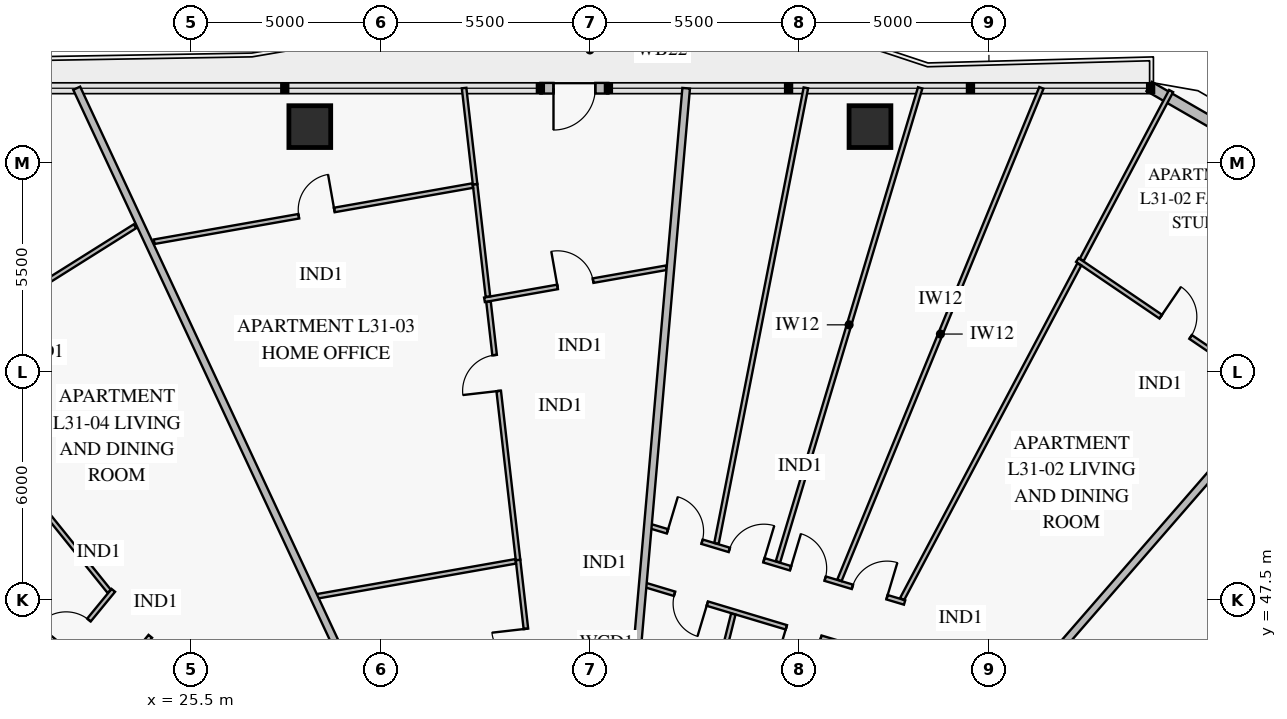
"""IFC4 building model, lengths in metres.
Left out: names, types, materials, properties, quantities, classifications, styles, units other than length and angle.
Written with IfcOpenShell. Run it as: python <this file> out.ifc"""

import sys

from ifc_helpers import new_model, si_unit, direction, frame, frame_2d, origin, origin_2d, place, context, subcontext, project, spatial, rectangle, extrude, element, fill, save


model = new_model("IFC4")
c1 = context("Model", 3, precision=1e-05, world=origin(), true_north=direction((0.0, 1.0)))
c2 = subcontext(c1, "Body", "Model", "MODEL_VIEW")
j1 = project(units=[si_unit("LENGTHUNIT", "METRE"), si_unit("PLANEANGLEUNIT", "RADIAN")], contexts=[c1])
p1 = place(None, origin())
s1 = spatial("IfcSite", under=j1, at=p1, CompositionType="ELEMENT")
p2 = place(p1, origin())
s2 = spatial("IfcBuilding", under=s1, at=p2, CompositionType="ELEMENT")
p3 = place(p2, frame((0.0, 0.0, 126.6)))
s3 = spatial("IfcBuildingStorey", under=s2, at=p3, CompositionType="ELEMENT", Elevation=126.6)
for number, where, z_axis, x_axis in (
    (1, (43.37, 59.948, 0.0), (0.0, 0.0, 1.0), (-1.0, 0.0, 0.0)),
    (2, (28.63, 59.948, 0.0), (0.0, 0.0, 1.0), (-1.0, 0.0, 0.0)),
):
    element("IfcColumn", number, at=place(p3, frame(where, z_axis=z_axis, x_axis=x_axis)), inside=s3, PredefinedType="COLUMN", context=c2, shape_type="SweptSolid", body=[
        extrude(rectangle(XDim=1.1, YDim=1.1, at=origin_2d()), origin(), (0.0, 0.0, 1.0), 3.55),
    ])
p4 = place(p3, frame((34.697, 60.958, 0.0), z_axis=(0.0, 0.0, 1.0), x_axis=(1.0, 0.0, 0.0)))
e3 = element("IfcWall", 3, at=p4, inside=s3, PredefinedType="SOLIDWALL", context=c2, shape_type="SweptSolid", body=[
    extrude(rectangle(XDim=1.79, YDim=0.28, at=frame_2d((0.895, 0.0))), origin(), (0.0, 0.0, 1.0), 3.55),
])
p5 = place(p4, frame((0.345, 0.0, 0.0)))
e4 = element("IfcOpeningElement", 4, at=p5, cuts=e3, PredefinedType="OPENING", context=c2, shape_type="SweptSolid", body=[
    extrude(rectangle(XDim=1.1, YDim=2.2, at=frame_2d((0.55, 1.1))), frame((0.0, 0.152, 0.0), z_axis=(0.0, -1.0, 0.0), x_axis=(1.0, 0.0, 0.0)), (0.0, 0.0, 1.0), 0.304),
])
p6 = place(p3, frame((50.717, 61.006, 0.0), z_axis=(0.0, 0.0, 1.0), x_axis=(0.866007452331, -0.500031091541, 0.0)))
e5 = element("IfcWall", 5, at=p6, inside=s3, PredefinedType="SOLIDWALL", context=c2, shape_type="SweptSolid", body=[
    extrude(rectangle(XDim=3.515, YDim=0.28, at=frame_2d((1.757, 0.0))), origin(), (0.0, 0.0, 1.0), 3.55),
])
p7 = place(p3, frame((54.001, 52.923, 0.0), z_axis=(0.0, 0.0, 1.0), x_axis=(-0.827088330425, 0.562071964854, 0.0)))
e6 = element("IfcWall", 6, at=p7, inside=s3, PredefinedType="PARTITIONING", context=c2, shape_type="SweptSolid", body=[
    extrude(rectangle(XDim=6.256, YDim=0.12, at=frame_2d((3.128, 0.0))), origin(), (0.0, 0.0, 1.0), 3.55),
])
p8 = place(p7, frame((2.653, 0.0, 0.0)))
e7 = element("IfcOpeningElement", 7, at=p8, cuts=e6, PredefinedType="OPENING", context=c2, shape_type="SweptSolid", body=[
    extrude(rectangle(XDim=0.95, YDim=2.1, at=frame_2d((0.475, 1.05))), frame((0.0, 0.072, 0.0), z_axis=(0.0, -1.0, 0.0), x_axis=(1.0, 0.0, 0.0)), (0.0, 0.0, 1.0), 0.144),
])
p9 = place(p3, frame((43.556, 46.057, 0.0), z_axis=(0.0, 0.0, 1.0), x_axis=(-0.957822082652, 0.287361893759, 0.0)))
e8 = element("IfcWall", 8, at=p9, inside=s3, PredefinedType="PARTITIONING", context=c2, shape_type="SweptSolid", body=[
    extrude(rectangle(XDim=6.396, YDim=0.12, at=frame_2d((3.198, 0.0))), origin(), (0.0, 0.0, 1.0), 2.85),
])
p10 = place(p9, frame((1.542, 0.0, 0.0)))
e9 = element("IfcOpeningElement", 9, at=p10, cuts=e8, PredefinedType="OPENING", context=c2, shape_type="SweptSolid", body=[
    extrude(rectangle(XDim=0.95, YDim=2.1, at=frame_2d((0.475, 1.05))), frame((0.0, 0.072, 0.0), z_axis=(0.0, -1.0, 0.0), x_axis=(1.0, 0.0, 0.0)), (0.0, 0.0, 1.0), 0.144),
])
p11 = place(p9, frame((4.663, 0.0, 0.0)))
e10 = element("IfcOpeningElement", 10, at=p11, cuts=e8, PredefinedType="OPENING", context=c2, shape_type="SweptSolid", body=[
    extrude(rectangle(XDim=0.9, YDim=2.1, at=frame_2d((0.45, 1.05))), frame((0.0, 0.072, 0.0), z_axis=(0.0, -1.0, 0.0), x_axis=(1.0, 0.0, 0.0)), (0.0, 0.0, 1.0), 0.144),
])
p12 = place(p3, frame((44.281, 47.426, 0.0), z_axis=(0.0, 0.0, 1.0), x_axis=(-0.957812840143, 0.287392698684, 0.0)))
e11 = element("IfcWall", 11, at=p12, inside=s3, PredefinedType="PARTITIONING", context=c2, shape_type="SweptSolid", body=[
    extrude(rectangle(XDim=6.997, YDim=0.12, at=frame_2d((3.499, 0.0))), origin(), (0.0, 0.0, 1.0), 2.85),
])
p13 = place(p12, frame((0.483, 0.0, 0.0)))
e12 = element("IfcOpeningElement", 12, at=p13, cuts=e11, PredefinedType="OPENING", context=c2, shape_type="SweptSolid", body=[
    extrude(rectangle(XDim=0.95, YDim=2.1, at=frame_2d((0.475, 1.05))), frame((0.0, 0.072, 0.0), z_axis=(0.0, -1.0, 0.0), x_axis=(1.0, 0.0, 0.0)), (0.0, 0.0, 1.0), 0.144),
])
p14 = place(p12, frame((2.182, 0.0, 0.0)))
e13 = element("IfcOpeningElement", 13, at=p14, cuts=e11, PredefinedType="OPENING", context=c2, shape_type="SweptSolid", body=[
    extrude(rectangle(XDim=0.95, YDim=2.1, at=frame_2d((0.475, 1.05))), frame((0.0, 0.072, 0.0), z_axis=(0.0, -1.0, 0.0), x_axis=(1.0, 0.0, 0.0)), (0.0, 0.0, 1.0), 0.144),
])
p15 = place(p12, frame((3.865, 0.0, 0.0)))
e14 = element("IfcOpeningElement", 14, at=p15, cuts=e11, PredefinedType="OPENING", context=c2, shape_type="SweptSolid", body=[
    extrude(rectangle(XDim=0.95, YDim=2.1, at=frame_2d((0.475, 1.05))), frame((0.0, 0.072, 0.0), z_axis=(0.0, -1.0, 0.0), x_axis=(1.0, 0.0, 0.0)), (0.0, 0.0, 1.0), 0.144),
])
p16 = place(p12, frame((5.564, 0.0, 0.0)))
e15 = element("IfcOpeningElement", 15, at=p16, cuts=e11, PredefinedType="OPENING", context=c2, shape_type="SweptSolid", body=[
    extrude(rectangle(XDim=0.95, YDim=2.1, at=frame_2d((0.475, 1.05))), frame((0.0, 0.072, 0.0), z_axis=(0.0, -1.0, 0.0), x_axis=(1.0, 0.0, 0.0)), (0.0, 0.0, 1.0), 0.144),
])
p17 = place(p3, frame((38.008, 56.234, 0.0), z_axis=(0.0, 0.0, 1.0), x_axis=(-0.984810882198, -0.173630430239, 0.0)))
e16 = element("IfcWall", 16, at=p17, inside=s3, PredefinedType="PARTITIONING", context=c2, shape_type="SweptSolid", body=[
    extrude(rectangle(XDim=4.855, YDim=0.12, at=frame_2d((2.428, 0.0))), origin(), (0.0, 0.0, 1.0), 3.55),
])
p18 = place(p17, frame((1.953, 0.0, 0.0)))
e17 = element("IfcOpeningElement", 17, at=p18, cuts=e16, PredefinedType="OPENING", context=c2, shape_type="SweptSolid", body=[
    extrude(rectangle(XDim=0.95, YDim=2.1, at=frame_2d((0.475, 1.05))), frame((0.0, 0.072, 0.0), z_axis=(0.0, -1.0, 0.0), x_axis=(1.0, 0.0, 0.0)), (0.0, 0.0, 1.0), 0.144),
])
p19 = place(p3, frame((34.554, 44.65, 0.0), z_axis=(0.0, 0.0, 1.0), x_axis=(-0.113574688957, 0.993529461077, 0.0)))
e18 = element("IfcWall", 18, at=p19, inside=s3, PredefinedType="PARTITIONING", context=c2, shape_type="SweptSolid", body=[
    extrude(rectangle(XDim=3.921, YDim=0.12, at=frame_2d((1.96, 0.0))), origin(), (0.0, 0.0, 1.0), 3.55),
])
p20 = place(p19, frame((1.197, 0.0, 0.0)))
e19 = element("IfcOpeningElement", 19, at=p20, cuts=e18, PredefinedType="OPENING", context=c2, shape_type="SweptSolid", body=[
    extrude(rectangle(XDim=0.9, YDim=2.1, at=frame_2d((0.45, 1.05))), frame((0.0, 0.072, 0.0), z_axis=(0.0, -1.0, 0.0), x_axis=(1.0, 0.0, 0.0)), (0.0, 0.0, 1.0), 0.144),
])
p21 = place(p3, frame((34.109, 48.545, 0.0), z_axis=(0.0, 0.0, 1.0), x_axis=(-0.113541557806, 0.993533247884, 0.0)))
e20 = element("IfcWall", 20, at=p21, inside=s3, PredefinedType="PARTITIONING", context=c2, shape_type="SweptSolid", body=[
    extrude(rectangle(XDim=6.84, YDim=0.12, at=frame_2d((3.42, 0.0))), origin(), (0.0, 0.0, 1.0), 3.1),
])
p22 = place(p21, frame((4.476, 0.0, 0.0)))
e21 = element("IfcOpeningElement", 21, at=p22, cuts=e20, PredefinedType="OPENING", context=c2, shape_type="SweptSolid", body=[
    extrude(rectangle(XDim=0.95, YDim=2.1, at=frame_2d((0.475, 1.05))), frame((0.0, 0.072, 0.0), z_axis=(0.0, -1.0, 0.0), x_axis=(1.0, 0.0, 0.0)), (0.0, 0.0, 1.0), 0.144),
])
p23 = place(p3, frame((33.317, 55.476, 0.0), z_axis=(0.0, 0.0, 1.0), x_axis=(-0.113518831764, 0.993535844766, 0.0)))
e22 = element("IfcWall", 22, at=p23, inside=s3, PredefinedType="PARTITIONING", context=c2, shape_type="SweptSolid", body=[
    extrude(rectangle(XDim=2.977, YDim=0.12, at=frame_2d((1.488, 0.0))), origin(), (0.0, 0.0, 1.0), 3.55),
])
p24 = place(p3, frame((32.915, 58.397, 0.0), z_axis=(0.0, 0.0, 1.0), x_axis=(-0.984808385469, -0.17364459079, 0.0)))
e23 = element("IfcWall", 23, at=p24, inside=s3, PredefinedType="PARTITIONING", context=c2, shape_type="SweptSolid", body=[
    extrude(rectangle(XDim=8.51, YDim=0.12, at=frame_2d((4.255, 0.0))), origin(), (0.0, 0.0, 1.0), 2.85),
])
p25 = place(p24, frame((3.696, 0.0, 0.0)))
e24 = element("IfcOpeningElement", 24, at=p25, cuts=e23, PredefinedType="OPENING", context=c2, shape_type="SweptSolid", body=[
    extrude(rectangle(XDim=0.95, YDim=2.1, at=frame_2d((0.475, 1.05))), frame((0.0, 0.072, 0.0), z_axis=(0.0, -1.0, 0.0), x_axis=(1.0, 0.0, 0.0)), (0.0, 0.0, 1.0), 0.144),
])
p26 = place(p3, frame((24.03, 57.328, 0.0), z_axis=(0.0, 0.0, 1.0), x_axis=(-0.846561448229, -0.532291005346, 0.0)))
e25 = element("IfcWall", 25, at=p26, inside=s3, PredefinedType="PARTITIONING", context=c2, shape_type="SweptSolid", body=[
    extrude(rectangle(XDim=6.697, YDim=0.12, at=frame_2d((3.348, 0.0))), origin(), (0.0, 0.0, 1.0), 2.8),
])
p27 = place(p26, frame((2.873, 0.0, 0.0)))
e26 = element("IfcOpeningElement", 26, at=p27, cuts=e25, PredefinedType="OPENING", context=c2, shape_type="SweptSolid", body=[
    extrude(rectangle(XDim=0.95, YDim=2.1, at=frame_2d((0.475, 1.05))), frame((0.0, 0.072, 0.0), z_axis=(0.0, -1.0, 0.0), x_axis=(1.0, 0.0, 0.0)), (0.0, 0.0, 1.0), 0.144),
])
p28 = place(p3, frame((24.433, 46.536, 0.0), z_axis=(0.0, 0.0, 1.0), x_axis=(-0.633934690798, -0.773386583671, 0.0)))
e27 = element("IfcWall", 27, at=p28, inside=s3, PredefinedType="PARTITIONING", context=c2, shape_type="SweptSolid", body=[
    extrude(rectangle(XDim=7.819, YDim=0.12, at=frame_2d((3.909, 0.0))), origin(), (0.0, 0.0, 1.0), 2.85),
])
p29 = place(p28, frame((1.321, 0.0, 0.0)))
e28 = element("IfcOpeningElement", 28, at=p29, cuts=e27, PredefinedType="OPENING", context=c2, shape_type="SweptSolid", body=[
    extrude(rectangle(XDim=0.95, YDim=2.1, at=frame_2d((0.475, 1.05))), frame((0.0, 0.072, 0.0), z_axis=(0.0, -1.0, 0.0), x_axis=(1.0, 0.0, 0.0)), (0.0, 0.0, 1.0), 0.144),
])
p30 = place(p28, frame((5.813, 0.0, 0.0)))
e29 = element("IfcOpeningElement", 29, at=p30, cuts=e27, PredefinedType="OPENING", context=c2, shape_type="SweptSolid", body=[
    extrude(rectangle(XDim=0.9, YDim=2.1, at=frame_2d((0.45, 1.05))), frame((0.0, 0.072, 0.0), z_axis=(0.0, -1.0, 0.0), x_axis=(1.0, 0.0, 0.0)), (0.0, 0.0, 1.0), 0.144),
])
p31 = place(p3, frame((23.459, 47.746, 0.0), z_axis=(0.0, 0.0, 1.0), x_axis=(-0.633918329218, -0.773399994751, 0.0)))
e30 = element("IfcWall", 30, at=p31, inside=s3, PredefinedType="PARTITIONING", context=c2, shape_type="SweptSolid", body=[
    extrude(rectangle(XDim=8.456, YDim=0.12, at=frame_2d((4.228, 0.0))), origin(), (0.0, 0.0, 1.0), 2.85),
])
p32 = place(p31, frame((1.01, 0.0, 0.0)))
e31 = element("IfcOpeningElement", 31, at=p32, cuts=e30, PredefinedType="OPENING", context=c2, shape_type="SweptSolid", body=[
    extrude(rectangle(XDim=0.95, YDim=2.1, at=frame_2d((0.475, 1.05))), frame((0.0, 0.072, 0.0), z_axis=(0.0, -1.0, 0.0), x_axis=(1.0, 0.0, 0.0)), (0.0, 0.0, 1.0), 0.144),
])
p33 = place(p31, frame((3.753, 0.0, 0.0)))
e32 = element("IfcOpeningElement", 32, at=p33, cuts=e30, PredefinedType="OPENING", context=c2, shape_type="SweptSolid", body=[
    extrude(rectangle(XDim=0.95, YDim=2.1, at=frame_2d((0.475, 1.05))), frame((0.0, 0.072, 0.0), z_axis=(0.0, -1.0, 0.0), x_axis=(1.0, 0.0, 0.0)), (0.0, 0.0, 1.0), 0.144),
])
p34 = place(p31, frame((6.496, 0.0, 0.0)))
e33 = element("IfcOpeningElement", 33, at=p34, cuts=e30, PredefinedType="OPENING", context=c2, shape_type="SweptSolid", body=[
    extrude(rectangle(XDim=0.95, YDim=2.1, at=frame_2d((0.475, 1.05))), frame((0.0, 0.072, 0.0), z_axis=(0.0, -1.0, 0.0), x_axis=(1.0, 0.0, 0.0)), (0.0, 0.0, 1.0), 0.144),
])
p35 = place(p3, frame((46.466, 44.04, 0.0), z_axis=(0.0, 0.0, 1.0), x_axis=(0.656061723069, 0.754707238287, 0.0)))
e34 = element("IfcWall", 34, at=p35, inside=s3, PredefinedType="PARTITIONING", context=c2, shape_type="SweptSolid", body=[
    extrude(rectangle(XDim=14.674, YDim=0.2, at=frame_2d((7.337, 0.0))), origin(), (0.0, 0.0, 1.0), 2.8),
])
p36 = place(p3, frame((39.002, 44.03, 0.0), z_axis=(0.0, 0.0, 1.0), x_axis=(0.242048665755, 0.97026411013, 0.0)))
e35 = element("IfcWall", 35, at=p36, inside=s3, PredefinedType="PARTITIONING", context=c2, shape_type="SweptSolid", body=[
    extrude(rectangle(XDim=3.185, YDim=0.12, at=frame_2d((1.593, 0.0))), origin(), (0.0, 0.0, 1.0), 2.85),
])
p37 = place(p3, frame((42.567, 48.011, 0.0), z_axis=(0.0, 0.0, 1.0), x_axis=(0.379443868759, 0.925214759103, 0.0)))
e36 = element("IfcWall", 36, at=p37, inside=s3, PredefinedType="PARTITIONING", context=c2, shape_type="SweptSolid", body=[
    extrude(rectangle(XDim=14.005, YDim=0.12, at=frame_2d((7.002, 0.0))), origin(), (0.0, 0.0, 1.0), 2.8),
])
p38 = place(p3, frame((40.949, 48.497, 0.0), z_axis=(0.0, 0.0, 1.0), x_axis=(0.287356486292, 0.957823704961, 0.0)))
e37 = element("IfcWall", 37, at=p38, inside=s3, PredefinedType="PARTITIONING", context=c2, shape_type="SweptSolid", body=[
    extrude(rectangle(XDim=13.021, YDim=0.12, at=frame_2d((6.51, 0.0))), origin(), (0.0, 0.0, 1.0), 2.8),
])
p39 = place(p3, frame((39.332, 48.982, 0.0), z_axis=(0.0, 0.0, 1.0), x_axis=(0.192513335822, 0.98129435723, 0.0)))
e38 = element("IfcWall", 38, at=p39, inside=s3, PredefinedType="PARTITIONING", context=c2, shape_type="SweptSolid", body=[
    extrude(rectangle(XDim=12.215, YDim=0.12, at=frame_2d((6.107, 0.0))), origin(), (0.0, 0.0, 1.0), 2.8),
])
p40 = place(p3, frame((44.216, 47.517, 0.0), z_axis=(0.0, 0.0, 1.0), x_axis=(0.467901230601, 0.883780763765, 0.0)))
e39 = element("IfcWall", 39, at=p40, inside=s3, PredefinedType="PARTITIONING", context=c2, shape_type="SweptSolid", body=[
    extrude(rectangle(XDim=9.963, YDim=0.12, at=frame_2d((4.982, 0.0))), origin(), (0.0, 0.0, 1.0), 3.1),
])
p41 = place(p3, frame((48.942, 56.443, 0.0), z_axis=(0.0, 0.0, 1.0), x_axis=(0.467903344083, 0.883779644819, 0.0)))
e40 = element("IfcWall", 40, at=p41, inside=s3, PredefinedType="PARTITIONING", context=c2, shape_type="SweptSolid", body=[
    extrude(rectangle(XDim=5.026, YDim=0.12, at=frame_2d((2.513, 0.0))), origin(), (0.0, 0.0, 1.0), 2.8),
])
p42 = place(p3, frame((37.053, 44.04, 0.0), z_axis=(0.0, 0.0, 1.0), x_axis=(0.087144480826, 0.996195683318, 0.0)))
e41 = element("IfcWall", 41, at=p42, inside=s3, PredefinedType="PARTITIONING", context=c2, shape_type="SweptSolid", body=[
    extrude(rectangle(XDim=16.983, YDim=0.2, at=frame_2d((8.492, 0.0))), origin(), (0.0, 0.0, 1.0), 2.8),
])
p43 = place(p3, frame((32.979, 58.434, 0.0), z_axis=(0.0, 0.0, 1.0), x_axis=(-0.113619602972, 0.993524325732, 0.0)))
e42 = element("IfcWall", 42, at=p43, inside=s3, PredefinedType="PARTITIONING", context=c2, shape_type="SweptSolid", body=[
    extrude(rectangle(XDim=2.546, YDim=0.12, at=frame_2d((1.273, 0.0))), origin(), (0.0, 0.0, 1.0), 2.8),
])
p44 = place(p3, frame((34.045, 48.509, 0.0), z_axis=(0.0, 0.0, 1.0), x_axis=(-0.984807496737, -0.173649631067, 0.0)))
e43 = element("IfcWall", 43, at=p44, inside=s3, PredefinedType="PARTITIONING", context=c2, shape_type="SweptSolid", body=[
    extrude(rectangle(XDim=5.337, YDim=0.12, at=frame_2d((2.668, 0.0))), origin(), (0.0, 0.0, 1.0), 2.85),
])
p45 = place(p3, frame((30.386, 44.04, 0.0), z_axis=(0.0, 0.0, 1.0), x_axis=(-0.422626983595, 0.906303719918, 0.0)))
e44 = element("IfcWall", 44, at=p45, inside=s3, PredefinedType="PARTITIONING", context=c2, shape_type="SweptSolid", body=[
    extrude(rectangle(XDim=18.667, YDim=0.2, at=frame_2d((9.334, 0.0))), origin(), (0.0, 0.0, 1.0), 2.8),
])
p46 = place(p3, frame((23.351, 47.721, 0.0), z_axis=(0.0, 0.0, 1.0), x_axis=(-0.62686542239, 0.779127551952, 0.0)))
e45 = element("IfcWall", 45, at=p46, inside=s3, PredefinedType="PARTITIONING", context=c2, shape_type="SweptSolid", body=[
    extrude(rectangle(XDim=7.756, YDim=0.12, at=frame_2d((3.878, 0.0))), origin(), (0.0, 0.0, 1.0), 3.1),
])
p47 = place(p5, frame((1.1, 0.0, 0.0), z_axis=(0.0, 0.0, 1.0), x_axis=(-1.0, 0.0, 0.0)))
e46 = element("IfcDoor", 46, at=p47, inside=s3, OperationType="SINGLE_SWING_RIGHT", PredefinedType="DOOR", context=c2, shape_type="SweptSolid", body=[
    extrude(rectangle(XDim=1.1, YDim=2.2, at=frame_2d((0.55, 1.1))), frame((0.0, 0.025, 0.0), z_axis=(0.0, -1.0, 0.0), x_axis=(1.0, 0.0, 0.0)), (0.0, 0.0, 1.0), 0.05),
])
fill(e4, e46)
p48 = place(p8, frame((0.95, 0.0, 0.0), z_axis=(0.0, 0.0, 1.0), x_axis=(-1.0, 0.0, 0.0)))
e47 = element("IfcDoor", 47, at=p48, inside=s3, OperationType="SINGLE_SWING_LEFT", PredefinedType="DOOR", context=c2, shape_type="SweptSolid", body=[
    extrude(rectangle(XDim=0.95, YDim=2.1, at=frame_2d((0.475, 1.05))), frame((0.0, 0.025, 0.0), z_axis=(0.0, -1.0, 0.0), x_axis=(1.0, 0.0, 0.0)), (0.0, 0.0, 1.0), 0.05),
])
fill(e7, e47)
p49 = place(p10, origin())
e48 = element("IfcDoor", 48, at=p49, inside=s3, OperationType="SINGLE_SWING_RIGHT", PredefinedType="DOOR", context=c2, shape_type="SweptSolid", body=[
    extrude(rectangle(XDim=0.95, YDim=2.1, at=frame_2d((0.475, 1.05))), frame((0.0, 0.025, 0.0), z_axis=(0.0, -1.0, 0.0), x_axis=(1.0, 0.0, 0.0)), (0.0, 0.0, 1.0), 0.05),
])
fill(e9, e48)
p50 = place(p11, origin())
e49 = element("IfcDoor", 49, at=p50, inside=s3, OperationType="SINGLE_SWING_LEFT", PredefinedType="DOOR", context=c2, shape_type="SweptSolid", body=[
    extrude(rectangle(XDim=0.9, YDim=2.1, at=frame_2d((0.45, 1.05))), frame((0.0, 0.025, 0.0), z_axis=(0.0, -1.0, 0.0), x_axis=(1.0, 0.0, 0.0)), (0.0, 0.0, 1.0), 0.05),
])
fill(e10, e49)
p51 = place(p13, frame((0.95, 0.0, 0.0), z_axis=(0.0, 0.0, 1.0), x_axis=(-1.0, 0.0, 0.0)))
e50 = element("IfcDoor", 50, at=p51, inside=s3, OperationType="SINGLE_SWING_RIGHT", PredefinedType="DOOR", context=c2, shape_type="SweptSolid", body=[
    extrude(rectangle(XDim=0.95, YDim=2.1, at=frame_2d((0.475, 1.05))), frame((0.0, 0.025, 0.0), z_axis=(0.0, -1.0, 0.0), x_axis=(1.0, 0.0, 0.0)), (0.0, 0.0, 1.0), 0.05),
])
fill(e12, e50)
p52 = place(p14, frame((0.95, 0.0, 0.0), z_axis=(0.0, 0.0, 1.0), x_axis=(-1.0, 0.0, 0.0)))
e51 = element("IfcDoor", 51, at=p52, inside=s3, OperationType="SINGLE_SWING_LEFT", PredefinedType="DOOR", context=c2, shape_type="SweptSolid", body=[
    extrude(rectangle(XDim=0.95, YDim=2.1, at=frame_2d((0.475, 1.05))), frame((0.0, 0.025, 0.0), z_axis=(0.0, -1.0, 0.0), x_axis=(1.0, 0.0, 0.0)), (0.0, 0.0, 1.0), 0.05),
])
fill(e13, e51)
p53 = place(p15, frame((0.95, 0.0, 0.0), z_axis=(0.0, 0.0, 1.0), x_axis=(-1.0, 0.0, 0.0)))
e52 = element("IfcDoor", 52, at=p53, inside=s3, OperationType="SINGLE_SWING_RIGHT", PredefinedType="DOOR", context=c2, shape_type="SweptSolid", body=[
    extrude(rectangle(XDim=0.95, YDim=2.1, at=frame_2d((0.475, 1.05))), frame((0.0, 0.025, 0.0), z_axis=(0.0, -1.0, 0.0), x_axis=(1.0, 0.0, 0.0)), (0.0, 0.0, 1.0), 0.05),
])
fill(e14, e52)
p54 = place(p16, frame((0.95, 0.0, 0.0), z_axis=(0.0, 0.0, 1.0), x_axis=(-1.0, 0.0, 0.0)))
e53 = element("IfcDoor", 53, at=p54, inside=s3, OperationType="SINGLE_SWING_LEFT", PredefinedType="DOOR", context=c2, shape_type="SweptSolid", body=[
    extrude(rectangle(XDim=0.95, YDim=2.1, at=frame_2d((0.475, 1.05))), frame((0.0, 0.025, 0.0), z_axis=(0.0, -1.0, 0.0), x_axis=(1.0, 0.0, 0.0)), (0.0, 0.0, 1.0), 0.05),
])
fill(e15, e53)
p55 = place(p18, frame((0.95, 0.0, 0.0), z_axis=(0.0, 0.0, 1.0), x_axis=(-1.0, 0.0, 0.0)))
e54 = element("IfcDoor", 54, at=p55, inside=s3, OperationType="SINGLE_SWING_LEFT", PredefinedType="DOOR", context=c2, shape_type="SweptSolid", body=[
    extrude(rectangle(XDim=0.95, YDim=2.1, at=frame_2d((0.475, 1.05))), frame((0.0, 0.025, 0.0), z_axis=(0.0, -1.0, 0.0), x_axis=(1.0, 0.0, 0.0)), (0.0, 0.0, 1.0), 0.05),
])
fill(e17, e54)
p56 = place(p20, origin())
e55 = element("IfcDoor", 55, at=p56, inside=s3, OperationType="SINGLE_SWING_RIGHT", PredefinedType="DOOR", context=c2, shape_type="SweptSolid", body=[
    extrude(rectangle(XDim=0.9, YDim=2.1, at=frame_2d((0.45, 1.05))), frame((0.0, 0.025, 0.0), z_axis=(0.0, -1.0, 0.0), x_axis=(1.0, 0.0, 0.0)), (0.0, 0.0, 1.0), 0.05),
])
fill(e19, e55)
p57 = place(p22, origin())
e56 = element("IfcDoor", 56, at=p57, inside=s3, OperationType="SINGLE_SWING_LEFT", PredefinedType="DOOR", context=c2, shape_type="SweptSolid", body=[
    extrude(rectangle(XDim=0.95, YDim=2.1, at=frame_2d((0.475, 1.05))), frame((0.0, 0.025, 0.0), z_axis=(0.0, -1.0, 0.0), x_axis=(1.0, 0.0, 0.0)), (0.0, 0.0, 1.0), 0.05),
])
fill(e21, e56)
p58 = place(p25, frame((0.95, 0.0, 0.0), z_axis=(0.0, 0.0, 1.0), x_axis=(-1.0, 0.0, 0.0)))
e57 = element("IfcDoor", 57, at=p58, inside=s3, OperationType="SINGLE_SWING_RIGHT", PredefinedType="DOOR", context=c2, shape_type="SweptSolid", body=[
    extrude(rectangle(XDim=0.95, YDim=2.1, at=frame_2d((0.475, 1.05))), frame((0.0, 0.025, 0.0), z_axis=(0.0, -1.0, 0.0), x_axis=(1.0, 0.0, 0.0)), (0.0, 0.0, 1.0), 0.05),
])
fill(e24, e57)
p59 = place(p32, frame((0.95, 0.0, 0.0), z_axis=(0.0, 0.0, 1.0), x_axis=(-1.0, 0.0, 0.0)))
e58 = element("IfcDoor", 58, at=p59, inside=s3, OperationType="SINGLE_SWING_LEFT", PredefinedType="DOOR", context=c2, shape_type="SweptSolid", body=[
    extrude(rectangle(XDim=0.95, YDim=2.1, at=frame_2d((0.475, 1.05))), frame((0.0, 0.025, 0.0), z_axis=(0.0, -1.0, 0.0), x_axis=(1.0, 0.0, 0.0)), (0.0, 0.0, 1.0), 0.05),
])
fill(e31, e58)
save(model, sys.argv[1])
